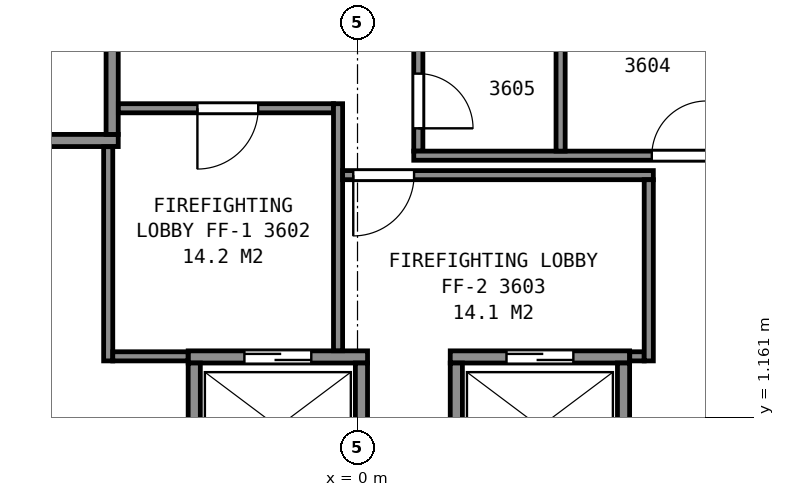
"""IFC4 building model, lengths in metres.
Left out: names, types, materials, properties, quantities, classifications, styles, units other than length and angle.
Written with IfcOpenShell. Run it as: python <this file> out.ifc"""

import sys

from ifc_helpers import new_model, si_unit, direction, frame, frame_2d, origin, place, context, subcontext, project, spatial, rectangle, extrude, element, fill, save


model = new_model("IFC4")
c1 = context("Model", 3, precision=1e-05, world=origin(), true_north=direction((0.0, 1.0)))
c2 = subcontext(c1, "Body", "Model", "MODEL_VIEW")
j1 = project(units=[si_unit("LENGTHUNIT", "METRE"), si_unit("PLANEANGLEUNIT", "RADIAN")], contexts=[c1])
p1 = place(None, origin())
s1 = spatial("IfcSite", under=j1, at=p1, CompositionType="ELEMENT")
p2 = place(p1, origin())
s2 = spatial("IfcBuilding", under=s1, at=p2, CompositionType="ELEMENT")
p3 = place(p2, frame((0.0, 0.0, 148.8)))
s3 = spatial("IfcBuildingStorey", under=s2, at=p3, CompositionType="ELEMENT", Elevation=148.8)
p4 = place(p3, frame((-2.785, 2.15, 0.0), z_axis=(0.0, 0.0, 1.0), x_axis=(1.0, 0.0, 0.0)))
e1 = element("IfcWall", 1, at=p4, inside=s3, PredefinedType="PARTITIONING", context=c2, shape_type="SweptSolid", body=[
    extrude(rectangle(XDim=2.95, YDim=0.2, at=frame_2d((1.475, 0.0))), origin(), (0.0, 0.0, 1.0), 3.7),
])
p5 = place(p4, frame((0.925, 0.0, 0.0)))
e2 = element("IfcOpeningElement", 2, at=p5, cuts=e1, PredefinedType="OPENING", context=c2, shape_type="SweptSolid", body=[
    extrude(rectangle(XDim=1.1, YDim=2.1, at=frame_2d((0.55, 1.05))), frame((0.0, 0.11, 0.0), z_axis=(0.0, -1.0, 0.0), x_axis=(1.0, 0.0, 0.0)), (0.0, 0.0, 1.0), 0.22),
])
p6 = place(p3, frame((1.525, 2.15, 0.0), z_axis=(0.0, 0.0, 1.0), x_axis=(1.0, 0.0, 0.0)))
e3 = element("IfcWall", 3, at=p6, inside=s3, PredefinedType="PARTITIONING", context=c2, shape_type="SweptSolid", body=[
    extrude(rectangle(XDim=2.95, YDim=0.2, at=frame_2d((1.475, 0.0))), origin(), (0.0, 0.0, 1.0), 3.7),
])
p7 = place(p6, frame((0.925, 0.0, 0.0)))
e4 = element("IfcOpeningElement", 4, at=p7, cuts=e3, PredefinedType="OPENING", context=c2, shape_type="SweptSolid", body=[
    extrude(rectangle(XDim=1.1, YDim=2.1, at=frame_2d((0.55, 1.05))), frame((0.0, 0.11, 0.0), z_axis=(0.0, -1.0, 0.0), x_axis=(1.0, 0.0, 0.0)), (0.0, 0.0, 1.0), 0.22),
])
p8 = place(p3, frame((-6.285, 5.71, 0.0), z_axis=(0.0, 0.0, 1.0), x_axis=(1.0, 0.0, 0.0)))
e5 = element("IfcWall", 5, at=p8, inside=s3, PredefinedType="PARTITIONING", context=c2, shape_type="SweptSolid", body=[
    extrude(rectangle(XDim=2.35, YDim=0.2, at=frame_2d((1.175, 0.0))), origin(), (0.0, 0.0, 1.0), 3.7),
])
p9 = place(p3, frame((5.663, -1.612, 0.0), z_axis=(0.0, 0.0, 1.0), x_axis=(0.49998122708, 0.866036242063, 0.0)))
e6 = element("IfcWall", 6, at=p9, inside=s3, PredefinedType="PARTITIONING", context=c2, shape_type="SweptSolid", body=[
    extrude(rectangle(XDim=4.9, YDim=0.2, at=frame_2d((2.45, 0.0))), origin(), (0.0, 0.0, 1.0), 3.7),
])
for number, where, z_axis, x_axis in (
    (7, (4.375, 0.1, 0.0), (0.0, 0.0, 1.0), (0.0, 1.0, 0.0)),
    (8, (1.625, 0.1, 0.0), (0.0, 0.0, 1.0), (0.0, 1.0, 0.0)),
    (9, (0.065, 0.1, 0.0), (0.0, 0.0, 1.0), (0.0, 1.0, 0.0)),
    (10, (-2.685, 0.1, 0.0), (0.0, 0.0, 1.0), (0.0, 1.0, 0.0)),
):
    element("IfcWall", number, at=place(p3, frame(where, z_axis=z_axis, x_axis=x_axis)), inside=s3, PredefinedType="PARTITIONING", context=c2, shape_type="SweptSolid", body=[
        extrude(rectangle(XDim=1.95, YDim=0.2, at=frame_2d((0.975, 0.0))), origin(), (0.0, 0.0, 1.0), 3.7),
    ])
p10 = place(p3, frame((-4.035, 5.81, 0.0), z_axis=(0.0, 0.0, 1.0), x_axis=(0.0, 1.0, 0.0)))
e11 = element("IfcWall", 11, at=p10, inside=s3, PredefinedType="PARTITIONING", context=c2, shape_type="SweptSolid", body=[
    extrude(rectangle(XDim=1.75, YDim=0.2, at=frame_2d((0.875, 0.0))), origin(), (0.0, 0.0, 1.0), 3.7),
])
p11 = place(p3, frame((-4.1, 2.085, 0.0), z_axis=(0.0, 0.0, 1.0), x_axis=(0.0, 1.0, 0.0)))
e12 = element("IfcWall", 12, at=p11, inside=s3, PredefinedType="PARTITIONING", context=c2, shape_type="SweptSolid", body=[
    extrude(rectangle(XDim=3.523, YDim=0.15, at=frame_2d((1.761, 0.0))), origin(), (0.0, 0.0, 1.0), 3.45),
])
p12 = place(p3, frame((-4.025, 2.16, 0.0), z_axis=(0.0, 0.0, 1.0), x_axis=(1.0, 0.0, 0.0)))
e13 = element("IfcWall", 13, at=p12, inside=s3, PredefinedType="PARTITIONING", context=c2, shape_type="SweptSolid", body=[
    extrude(rectangle(XDim=1.238, YDim=0.15, at=frame_2d((0.619, 0.0))), origin(), (0.0, 0.0, 1.0), 3.45),
])
p13 = place(p3, frame((-3.933, 6.24, 0.0), z_axis=(0.0, 0.0, 1.0), x_axis=(1.0, 0.0, 0.0)))
e14 = element("IfcWall", 14, at=p13, inside=s3, PredefinedType="PARTITIONING", context=c2, shape_type="SweptSolid", body=[
    extrude(rectangle(XDim=3.538, YDim=0.15, at=frame_2d((1.769, 0.0))), origin(), (0.0, 0.0, 1.0), 3.45),
])
p14 = place(p13, frame((1.3, 0.0, 0.0)))
e15 = element("IfcOpeningElement", 15, at=p14, cuts=e14, PredefinedType="OPENING", context=c2, shape_type="SweptSolid", body=[
    extrude(rectangle(XDim=1.0, YDim=2.1, at=frame_2d((0.5, 1.05))), frame((0.0, 0.085, 0.0), z_axis=(0.0, -1.0, 0.0), x_axis=(1.0, 0.0, 0.0)), (0.0, 0.0, 1.0), 0.17),
])
p15 = place(p3, frame((-0.32, 2.252, 0.0), z_axis=(0.0, 0.0, 1.0), x_axis=(0.0, 1.0, 0.0)))
e16 = element("IfcWall", 16, at=p15, inside=s3, PredefinedType="PARTITIONING", context=c2, shape_type="SweptSolid", body=[
    extrude(rectangle(XDim=4.063, YDim=0.15, at=frame_2d((2.031, 0.0))), origin(), (0.0, 0.0, 1.0), 3.45),
])
p16 = place(p3, frame((-0.245, 5.14, 0.0), z_axis=(0.0, 0.0, 1.0), x_axis=(1.0, 0.0, 0.0)))
e17 = element("IfcWall", 17, at=p16, inside=s3, PredefinedType="PARTITIONING", context=c2, shape_type="SweptSolid", body=[
    extrude(rectangle(XDim=5.11, YDim=0.15, at=frame_2d((2.555, 0.0))), origin(), (0.0, 0.0, 1.0), 3.45),
])
p17 = place(p16, frame((0.175, 0.0, 0.0)))
e18 = element("IfcOpeningElement", 18, at=p17, cuts=e17, PredefinedType="OPENING", context=c2, shape_type="SweptSolid", body=[
    extrude(rectangle(XDim=1.0, YDim=2.1, at=frame_2d((0.5, 1.05))), frame((0.0, 0.085, 0.0), z_axis=(0.0, -1.0, 0.0), x_axis=(1.0, 0.0, 0.0)), (0.0, 0.0, 1.0), 0.17),
])
p18 = place(p3, frame((1.0, 7.56, 0.0), z_axis=(0.0, 0.0, 1.0), x_axis=(0.0, -1.0, 0.0)))
e19 = element("IfcWall", 19, at=p18, inside=s3, PredefinedType="PARTITIONING", context=c2, shape_type="SweptSolid", body=[
    extrude(rectangle(XDim=2.025, YDim=0.15, at=frame_2d((1.013, 0.0))), origin(), (0.0, 0.0, 1.0), 3.45),
])
p19 = place(p18, frame((0.75, 0.0, 0.0)))
e20 = element("IfcOpeningElement", 20, at=p19, cuts=e19, PredefinedType="OPENING", context=c2, shape_type="SweptSolid", body=[
    extrude(rectangle(XDim=0.9, YDim=2.1, at=frame_2d((0.45, 1.05))), frame((0.0, 0.085, 0.0), z_axis=(0.0, -1.0, 0.0), x_axis=(1.0, 0.0, 0.0)), (0.0, 0.0, 1.0), 0.17),
])
p20 = place(p3, frame((0.925, 5.46, 0.0), z_axis=(0.0, 0.0, 1.0), x_axis=(1.0, 0.0, 0.0)))
e21 = element("IfcWall", 21, at=p20, inside=s3, PredefinedType="PARTITIONING", context=c2, shape_type="SweptSolid", body=[
    extrude(rectangle(XDim=5.22, YDim=0.15, at=frame_2d((2.61, 0.0))), origin(), (0.0, 0.0, 1.0), 3.45),
])
p21 = place(p20, frame((3.915, 0.0, 0.0)))
e22 = element("IfcOpeningElement", 22, at=p21, cuts=e21, PredefinedType="OPENING", context=c2, shape_type="SweptSolid", body=[
    extrude(rectangle(XDim=0.9, YDim=2.1, at=frame_2d((0.45, 1.05))), frame((0.0, 0.085, 0.0), z_axis=(0.0, -1.0, 0.0), x_axis=(1.0, 0.0, 0.0)), (0.0, 0.0, 1.0), 0.17),
])
p22 = place(p3, frame((3.34, 5.535, 0.0), z_axis=(0.0, 0.0, 1.0), x_axis=(0.0, 1.0, 0.0)))
e23 = element("IfcWall", 23, at=p22, inside=s3, PredefinedType="PARTITIONING", context=c2, shape_type="SweptSolid", body=[
    extrude(rectangle(XDim=2.025, YDim=0.15, at=frame_2d((1.013, 0.0))), origin(), (0.0, 0.0, 1.0), 3.45),
])
p23 = place(p3, frame((4.477, 2.16, 0.0), z_axis=(0.0, 0.0, 1.0), x_axis=(1.0, 0.0, 0.0)))
e24 = element("IfcWall", 24, at=p23, inside=s3, PredefinedType="PARTITIONING", context=c2, shape_type="SweptSolid", body=[
    extrude(rectangle(XDim=0.238, YDim=0.15, at=frame_2d((0.119, 0.0))), origin(), (0.0, 0.0, 1.0), 3.45),
])
p24 = place(p3, frame((4.79, 2.085, 0.0), z_axis=(0.0, 0.0, 1.0), x_axis=(0.0, 1.0, 0.0)))
e25 = element("IfcWall", 25, at=p24, inside=s3, PredefinedType="PARTITIONING", context=c2, shape_type="SweptSolid", body=[
    extrude(rectangle(XDim=2.98, YDim=0.15, at=frame_2d((1.49, 0.0))), origin(), (0.0, 0.0, 1.0), 3.45),
])
p25 = place(p3, frame((-4.075, -12.545, 0.0), z_axis=(0.0, 0.0, 1.0), x_axis=(-0.499999743747, 0.866025551732, 0.0)))
e26 = element("IfcWall", 26, at=p25, inside=s3, PredefinedType="PARTITIONING", context=c2, shape_type="SweptSolid", body=[
    extrude(rectangle(XDim=17.656, YDim=0.2, at=frame_2d((8.828, 0.0))), origin(), (0.0, 0.0, 1.0), 2.713),
])
p26 = place(p25, frame((10.08, 0.0, 0.0)))
e27 = element("IfcOpeningElement", 27, at=p26, cuts=e26, PredefinedType="OPENING", context=c2, shape_type="SweptSolid", body=[
    extrude(rectangle(XDim=0.9, YDim=2.1, at=frame_2d((0.45, 1.05))), frame((0.0, 0.11, 0.0), z_axis=(0.0, -1.0, 0.0), x_axis=(1.0, 0.0, 0.0)), (0.0, 0.0, 1.0), 0.22),
])
p27 = place(p25, frame((6.068, 0.0, 0.0)))
e28 = element("IfcOpeningElement", 28, at=p27, cuts=e26, PredefinedType="OPENING", context=c2, shape_type="SweptSolid", body=[
    extrude(rectangle(XDim=0.9, YDim=2.1, at=frame_2d((0.45, 1.05))), frame((0.0, 0.11, 0.0), z_axis=(0.0, -1.0, 0.0), x_axis=(1.0, 0.0, 0.0)), (0.0, 0.0, 1.0), 0.22),
])
p28 = place(p3, frame((12.928, 2.789, 0.0), z_axis=(0.0, 0.0, 1.0), x_axis=(-0.499997769292, -0.86602669168, 0.0)))
e29 = element("IfcWall", 29, at=p28, inside=s3, PredefinedType="PARTITIONING", context=c2, shape_type="SweptSolid", body=[
    extrude(rectangle(XDim=17.706, YDim=0.2, at=frame_2d((8.853, 0.0))), origin(), (0.0, 0.0, 1.0), 2.713),
])
p29 = place(p28, frame((15.156, 0.0, 0.0)))
e30 = element("IfcOpeningElement", 30, at=p29, cuts=e29, PredefinedType="OPENING", context=c2, shape_type="SweptSolid", body=[
    extrude(rectangle(XDim=1.2, YDim=2.1, at=frame_2d((0.6, 1.05))), frame((0.0, 0.11, 0.0), z_axis=(0.0, -1.0, 0.0), x_axis=(1.0, 0.0, 0.0)), (0.0, 0.0, 1.0), 0.22),
])
p30 = place(p28, frame((11.042, 0.0, 0.0)))
e31 = element("IfcOpeningElement", 31, at=p30, cuts=e29, PredefinedType="OPENING", context=c2, shape_type="SweptSolid", body=[
    extrude(rectangle(XDim=0.9, YDim=2.1, at=frame_2d((0.45, 1.05))), frame((0.0, 0.11, 0.0), z_axis=(0.0, -1.0, 0.0), x_axis=(1.0, 0.0, 0.0)), (0.0, 0.0, 1.0), 0.22),
])
p31 = place(p28, frame((7.14, 0.0, 0.0)))
e32 = element("IfcOpeningElement", 32, at=p31, cuts=e29, PredefinedType="OPENING", context=c2, shape_type="SweptSolid", body=[
    extrude(rectangle(XDim=0.9, YDim=2.1, at=frame_2d((0.45, 1.05))), frame((0.0, 0.11, 0.0), z_axis=(0.0, -1.0, 0.0), x_axis=(1.0, 0.0, 0.0)), (0.0, 0.0, 1.0), 0.22),
])
p32 = place(p28, frame((0.515, 0.0, 0.0)))
e33 = element("IfcOpeningElement", 33, at=p32, cuts=e29, PredefinedType="OPENING", context=c2, shape_type="SweptSolid", body=[
    extrude(rectangle(XDim=0.9, YDim=2.1, at=frame_2d((0.45, 1.05))), frame((0.0, 0.11, 0.0), z_axis=(0.0, -1.0, 0.0), x_axis=(1.0, 0.0, 0.0)), (0.0, 0.0, 1.0), 0.22),
])
p33 = place(p5, origin())
e34 = element("IfcDoor", 34, at=p33, inside=s3, OperationType="SLIDING_TO_LEFT", PredefinedType="DOOR", context=c2, shape_type="SweptSolid", body=[
    extrude(rectangle(XDim=1.1, YDim=2.1, at=frame_2d((0.55, 1.05))), frame((0.0, 0.025, 0.0), z_axis=(0.0, -1.0, 0.0), x_axis=(1.0, 0.0, 0.0)), (0.0, 0.0, 1.0), 0.05),
])
fill(e2, e34)
p34 = place(p7, origin())
e35 = element("IfcDoor", 35, at=p34, inside=s3, OperationType="SLIDING_TO_RIGHT", PredefinedType="DOOR", context=c2, shape_type="SweptSolid", body=[
    extrude(rectangle(XDim=1.1, YDim=2.1, at=frame_2d((0.55, 1.05))), frame((0.0, 0.025, 0.0), z_axis=(0.0, -1.0, 0.0), x_axis=(1.0, 0.0, 0.0)), (0.0, 0.0, 1.0), 0.05),
])
fill(e4, e35)
p35 = place(p14, origin())
e36 = element("IfcDoor", 36, at=p35, inside=s3, OperationType="SINGLE_SWING_LEFT", PredefinedType="DOOR", context=c2, shape_type="SweptSolid", body=[
    extrude(rectangle(XDim=1.0, YDim=2.1, at=frame_2d((0.5, 1.05))), frame((0.0, 0.025, 0.0), z_axis=(0.0, -1.0, 0.0), x_axis=(1.0, 0.0, 0.0)), (0.0, 0.0, 1.0), 0.05),
])
fill(e15, e36)
p36 = place(p17, origin())
e37 = element("IfcDoor", 37, at=p36, inside=s3, OperationType="SINGLE_SWING_LEFT", PredefinedType="DOOR", context=c2, shape_type="SweptSolid", body=[
    extrude(rectangle(XDim=1.0, YDim=2.1, at=frame_2d((0.5, 1.05))), frame((0.0, 0.025, 0.0), z_axis=(0.0, -1.0, 0.0), x_axis=(1.0, 0.0, 0.0)), (0.0, 0.0, 1.0), 0.05),
])
fill(e18, e37)
p37 = place(p19, origin())
e38 = element("IfcDoor", 38, at=p37, inside=s3, OperationType="SINGLE_SWING_RIGHT", PredefinedType="DOOR", context=c2, shape_type="SweptSolid", body=[
    extrude(rectangle(XDim=0.9, YDim=2.1, at=frame_2d((0.45, 1.05))), frame((0.0, 0.025, 0.0), z_axis=(0.0, -1.0, 0.0), x_axis=(1.0, 0.0, 0.0)), (0.0, 0.0, 1.0), 0.05),
])
fill(e20, e38)
p38 = place(p21, origin())
e39 = element("IfcDoor", 39, at=p38, inside=s3, OperationType="SINGLE_SWING_RIGHT", PredefinedType="DOOR", context=c2, shape_type="SweptSolid", body=[
    extrude(rectangle(XDim=0.9, YDim=2.1, at=frame_2d((0.45, 1.05))), frame((0.0, 0.025, 0.0), z_axis=(0.0, -1.0, 0.0), x_axis=(1.0, 0.0, 0.0)), (0.0, 0.0, 1.0), 0.05),
])
fill(e22, e39)
save(model, sys.argv[1])
